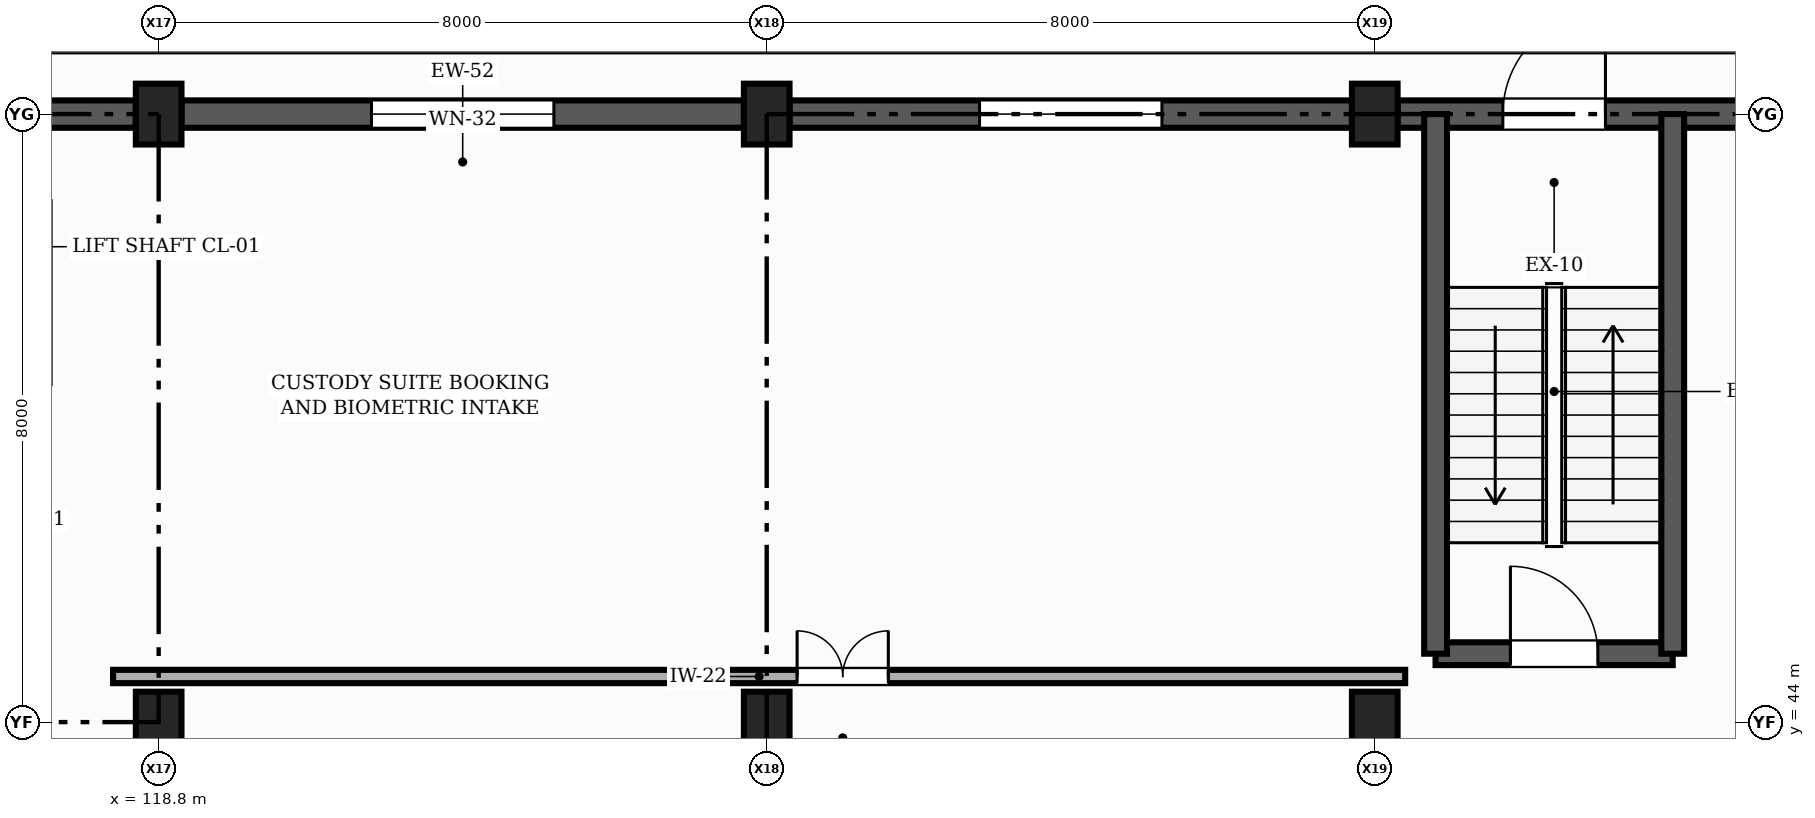
"""IFC4 building model, lengths in metres.
Left out: names, types, materials, properties, quantities, classifications, styles, units other than length and angle.
Written with IfcOpenShell. Run it as: python <this file> out.ifc"""

import sys

from ifc_helpers import new_model, si_unit, direction, frame, frame_2d, origin, origin_2d, place, context, subcontext, project, spatial, rectangle, extrude, element, fill, save


model = new_model("IFC4")
c1 = context("Model", 3, precision=1e-05, world=origin(), true_north=direction((0.0, 1.0)))
c2 = subcontext(c1, "Body", "Model", "MODEL_VIEW")
j1 = project(units=[si_unit("LENGTHUNIT", "METRE"), si_unit("PLANEANGLEUNIT", "RADIAN")], contexts=[c1])
p1 = place(None, origin())
s1 = spatial("IfcSite", under=j1, at=p1, CompositionType="ELEMENT")
p2 = place(p1, origin())
s2 = spatial("IfcBuilding", under=s1, at=p2, CompositionType="ELEMENT")
p3 = place(p2, origin())
s3 = spatial("IfcBuildingStorey", under=s2, at=p3, CompositionType="ELEMENT", Elevation=0.0)
for number, where, z_axis, x_axis in (
    (1, (118.8, 44.0, -0.5), (0.0, 0.0, 1.0), (1.0, 0.0, 0.0)),
    (2, (118.8, 52.0, -0.5), (0.0, 0.0, 1.0), (1.0, 0.0, 0.0)),
    (3, (126.8, 44.0, -0.5), (0.0, 0.0, 1.0), (1.0, 0.0, 0.0)),
    (4, (126.8, 52.0, -0.5), (0.0, 0.0, 1.0), (1.0, 0.0, 0.0)),
    (5, (134.8, 44.0, -0.5), (0.0, 0.0, 1.0), (1.0, 0.0, 0.0)),
    (6, (134.8, 52.0, -0.5), (0.0, 0.0, 1.0), (1.0, 0.0, 0.0)),
):
    element("IfcColumn", number, at=place(p3, frame(where, z_axis=z_axis, x_axis=x_axis)), inside=s3, PredefinedType="COLUMN", context=c2, shape_type="SweptSolid", body=[
        extrude(rectangle(XDim=0.6, YDim=0.8, at=origin_2d()), origin(), (0.0, 0.0, 1.0), 5.3),
    ])
p4 = place(p3, frame((142.5, 52.0, -0.42), z_axis=(0.0, 0.0, 1.0), x_axis=(-1.0, 0.0, 0.0)))
e7 = element("IfcWall", 7, at=p4, inside=s3, PredefinedType="SOLIDWALL", context=c2, shape_type="SweptSolid", body=[
    extrude(rectangle(XDim=7.4, YDim=0.36, at=frame_2d((3.7, 0.0))), origin(), (0.0, 0.0, 1.0), 4.95),
])
p5 = place(p4, frame((4.665, 0.0, 0.42)))
e8 = element("IfcOpeningElement", 8, at=p5, cuts=e7, PredefinedType="OPENING", context=c2, shape_type="SweptSolid", body=[
    extrude(rectangle(XDim=1.35, YDim=2.15, at=frame_2d((0.675, 1.075))), frame((0.0, 0.19, 0.0), z_axis=(0.0, -1.0, 0.0), x_axis=(1.0, 0.0, 0.0)), (0.0, 0.0, 1.0), 0.38),
])
p6 = place(p3, frame((134.5, 52.0, -0.42), z_axis=(0.0, 0.0, 1.0), x_axis=(-1.0, 0.0, 0.0)))
e9 = element("IfcWall", 9, at=p6, inside=s3, PredefinedType="SOLIDWALL", context=c2, shape_type="SweptSolid", body=[
    extrude(rectangle(XDim=7.4, YDim=0.36, at=frame_2d((3.7, 0.0))), origin(), (0.0, 0.0, 1.0), 4.13),
])
p7 = place(p6, frame((2.5, 0.0, 2.52)))
e10 = element("IfcOpeningElement", 10, at=p7, cuts=e9, PredefinedType="OPENING", context=c2, shape_type="SweptSolid", body=[
    extrude(rectangle(XDim=2.4, YDim=0.75, at=frame_2d((1.2, 0.375))), frame((0.0, 0.19, 0.0), z_axis=(0.0, -1.0, 0.0), x_axis=(1.0, 0.0, 0.0)), (0.0, 0.0, 1.0), 0.38),
])
p8 = place(p3, frame((126.5, 52.0, -0.42), z_axis=(0.0, 0.0, 1.0), x_axis=(-1.0, 0.0, 0.0)))
e11 = element("IfcWall", 11, at=p8, inside=s3, PredefinedType="SOLIDWALL", context=c2, shape_type="SweptSolid", body=[
    extrude(rectangle(XDim=7.4, YDim=0.36, at=frame_2d((3.7, 0.0))), origin(), (0.0, 0.0, 1.0), 4.13),
])
p9 = place(p8, frame((2.5, 0.0, 2.52)))
e12 = element("IfcOpeningElement", 12, at=p9, cuts=e11, PredefinedType="OPENING", context=c2, shape_type="SweptSolid", body=[
    extrude(rectangle(XDim=2.4, YDim=0.75, at=frame_2d((1.2, 0.375))), frame((0.0, 0.19, 0.0), z_axis=(0.0, -1.0, 0.0), x_axis=(1.0, 0.0, 0.0)), (0.0, 0.0, 1.0), 0.38),
])
p10 = place(p3, frame((118.5, 52.0, -0.42), z_axis=(0.0, 0.0, 1.0), x_axis=(-1.0, 0.0, 0.0)))
e13 = element("IfcWall", 13, at=p10, inside=s3, PredefinedType="SOLIDWALL", context=c2, shape_type="SweptSolid", body=[
    extrude(rectangle(XDim=7.4, YDim=0.36, at=frame_2d((3.7, 0.0))), origin(), (0.0, 0.0, 1.0), 4.95),
])
p11 = place(p10, frame((4.665, 0.0, 0.42)))
e14 = element("IfcOpeningElement", 14, at=p11, cuts=e13, PredefinedType="OPENING", context=c2, shape_type="SweptSolid", body=[
    extrude(rectangle(XDim=1.35, YDim=2.15, at=frame_2d((0.675, 1.075))), frame((0.0, 0.19, 0.0), z_axis=(0.0, -1.0, 0.0), x_axis=(1.0, 0.0, 0.0)), (0.0, 0.0, 1.0), 0.38),
])
p12 = place(p3, frame((135.6, 44.9, -0.52), z_axis=(0.0, 0.0, 1.0), x_axis=(1.0, 0.0, 0.0)))
e15 = element("IfcWall", 15, at=p12, inside=s3, PredefinedType="SHEAR", context=c2, shape_type="SweptSolid", body=[
    extrude(rectangle(XDim=3.12, YDim=0.3, at=frame_2d((1.56, 0.0))), origin(), (0.0, 0.0, 1.0), 5.32),
])
p13 = place(p12, frame((0.985, 0.0, 0.52)))
e16 = element("IfcOpeningElement", 16, at=p13, cuts=e15, PredefinedType="OPENING", context=c2, shape_type="SweptSolid", body=[
    extrude(rectangle(XDim=1.15, YDim=2.15, at=frame_2d((0.575, 1.075))), frame((0.0, 0.16, 0.0), z_axis=(0.0, -1.0, 0.0), x_axis=(1.0, 0.0, 0.0)), (0.0, 0.0, 1.0), 0.32),
])
for number, where, z_axis, x_axis in (
    (17, (138.72, 44.9, -0.52), (0.0, 0.0, 1.0), (0.0, 1.0, 0.0)),
    (18, (135.6, 52.0, -0.52), (0.0, 0.0, 1.0), (0.0, -1.0, 0.0)),
):
    element("IfcWall", number, at=place(p3, frame(where, z_axis=z_axis, x_axis=x_axis)), inside=s3, PredefinedType="SHEAR", context=c2, shape_type="SweptSolid", body=[
        extrude(rectangle(XDim=7.1, YDim=0.3, at=frame_2d((3.55, 0.0))), origin(), (0.0, 0.0, 1.0), 5.32),
    ])
p14 = place(p3, frame((118.2, 44.6, 0.0), z_axis=(0.0, 0.0, 1.0), x_axis=(1.0, 0.0, 0.0)))
e19 = element("IfcWall", 19, at=p14, inside=s3, PredefinedType="PARTITIONING", context=c2, shape_type="SweptSolid", body=[
    extrude(rectangle(XDim=17.0, YDim=0.175, at=frame_2d((8.5, 0.0))), origin(), (0.0, 0.0, 1.0), 3.795),
])
p15 = place(p14, frame((9.0, 0.0, 0.0)))
e20 = element("IfcOpeningElement", 20, at=p15, cuts=e19, PredefinedType="OPENING", context=c2, shape_type="SweptSolid", body=[
    extrude(rectangle(XDim=1.2, YDim=2.15, at=frame_2d((0.6, 1.075))), frame((0.0, 0.098, 0.0), z_axis=(0.0, -1.0, 0.0), x_axis=(1.0, 0.0, 0.0)), (0.0, 0.0, 1.0), 0.195),
])
p16 = place(p5, frame((1.35, 0.0, 0.0), z_axis=(0.0, 0.0, 1.0), x_axis=(-1.0, 0.0, 0.0)))
e21 = element("IfcDoor", 21, at=p16, inside=s3, OperationType="SINGLE_SWING_RIGHT", PredefinedType="DOOR", context=c2, shape_type="SweptSolid", body=[
    extrude(rectangle(XDim=1.35, YDim=2.15, at=frame_2d((0.675, 1.075))), frame((0.0, 0.025, 0.0), z_axis=(0.0, -1.0, 0.0), x_axis=(1.0, 0.0, 0.0)), (0.0, 0.0, 1.0), 0.05),
])
fill(e8, e21)
p17 = place(p7, origin())
e22 = element("IfcWindow", 22, at=p17, inside=s3, PartitioningType="SINGLE_PANEL", PredefinedType="WINDOW", context=c2, shape_type="SweptSolid", body=[
    extrude(rectangle(XDim=2.4, YDim=0.75, at=frame_2d((1.2, 0.375))), frame((0.0, 0.03, 0.0), z_axis=(0.0, -1.0, 0.0), x_axis=(1.0, 0.0, 0.0)), (0.0, 0.0, 1.0), 0.06),
])
fill(e10, e22)
p18 = place(p9, origin())
e23 = element("IfcWindow", 23, at=p18, inside=s3, PartitioningType="SINGLE_PANEL", PredefinedType="WINDOW", context=c2, shape_type="SweptSolid", body=[
    extrude(rectangle(XDim=2.4, YDim=0.75, at=frame_2d((1.2, 0.375))), frame((0.0, 0.03, 0.0), z_axis=(0.0, -1.0, 0.0), x_axis=(1.0, 0.0, 0.0)), (0.0, 0.0, 1.0), 0.06),
])
fill(e12, e23)
p19 = place(p13, origin())
e24 = element("IfcDoor", 24, at=p19, inside=s3, OperationType="SINGLE_SWING_LEFT", PredefinedType="DOOR", context=c2, shape_type="SweptSolid", body=[
    extrude(rectangle(XDim=1.15, YDim=2.15, at=frame_2d((0.575, 1.075))), frame((0.0, 0.025, 0.0), z_axis=(0.0, -1.0, 0.0), x_axis=(1.0, 0.0, 0.0)), (0.0, 0.0, 1.0), 0.05),
])
fill(e16, e24)
p20 = place(p15, origin())
e25 = element("IfcDoor", 25, at=p20, inside=s3, OperationType="DOUBLE_DOOR_SINGLE_SWING", PredefinedType="DOOR", context=c2, shape_type="SweptSolid", body=[
    extrude(rectangle(XDim=1.2, YDim=2.15, at=frame_2d((0.6, 1.075))), frame((0.0, 0.025, 0.0), z_axis=(0.0, -1.0, 0.0), x_axis=(1.0, 0.0, 0.0)), (0.0, 0.0, 1.0), 0.05),
])
fill(e20, e25)
save(model, sys.argv[1])
